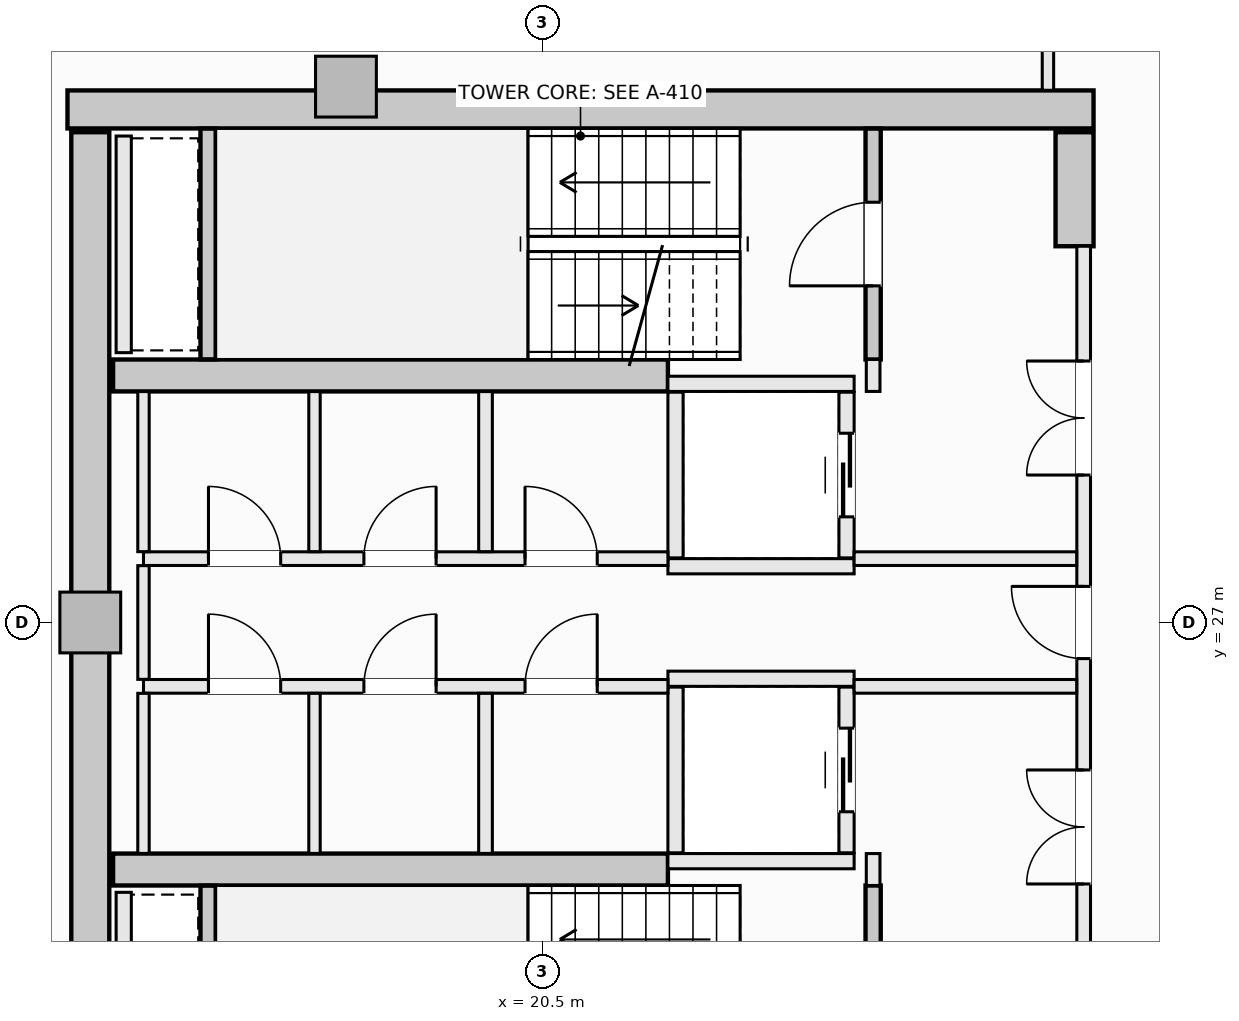
"""IFC4 building model, lengths in metres.
Left out: names, types, materials, properties, quantities, classifications, styles, units other than length and angle.
Written with IfcOpenShell. Run it as: python <this file> out.ifc"""

import sys

from ifc_helpers import new_model, si_unit, direction, frame, frame_2d, origin, origin_2d, place, context, subcontext, project, spatial, rectangle, extrude, element, fill, save


model = new_model("IFC4")
c1 = context("Model", 3, precision=1e-05, world=origin(), true_north=direction((0.0, 1.0)))
c2 = subcontext(c1, "Body", "Model", "MODEL_VIEW")
j1 = project(units=[si_unit("LENGTHUNIT", "METRE"), si_unit("PLANEANGLEUNIT", "RADIAN")], contexts=[c1])
p1 = place(None, origin())
s1 = spatial("IfcSite", under=j1, at=p1, CompositionType="ELEMENT")
p2 = place(p1, origin())
s2 = spatial("IfcBuilding", under=s1, at=p2, CompositionType="ELEMENT")
p3 = place(p2, frame((0.0, 0.0, 262.4)))
s3 = spatial("IfcBuildingStorey", under=s2, at=p3, CompositionType="ELEMENT", Elevation=262.4)
p4 = place(p3, frame((14.25, 33.75, -0.27), z_axis=(0.0, 0.0, 1.0), x_axis=(1.0, 0.0, 0.0)))
e1 = element("IfcWall", 1, at=p4, inside=s3, PredefinedType="SHEAR", context=c2, shape_type="SweptSolid", body=[
    extrude(rectangle(XDim=13.5, YDim=0.5, at=frame_2d((6.75, 0.0))), origin(), (0.0, 0.0, 1.0), 3.3),
])
p5 = place(p3, frame((14.55, 20.55, -0.27), z_axis=(0.0, 0.0, 1.0), x_axis=(0.0, 1.0, 0.0)))
e2 = element("IfcWall", 2, at=p5, inside=s3, PredefinedType="SHEAR", context=c2, shape_type="SweptSolid", body=[
    extrude(rectangle(XDim=12.9, YDim=0.5, at=frame_2d((6.45, 0.0))), origin(), (0.0, 0.0, 1.0), 3.3),
])
p6 = place(p3, frame((27.5, 31.95, -0.27), z_axis=(0.0, 0.0, 1.0), x_axis=(0.0, 1.0, 0.0)))
e3 = element("IfcWall", 3, at=p6, inside=s3, PredefinedType="SHEAR", context=c2, shape_type="SweptSolid", body=[
    extrude(rectangle(XDim=1.5, YDim=0.5, at=frame_2d((0.75, 0.0))), origin(), (0.0, 0.0, 1.0), 3.3),
])
for number, where, z_axis, x_axis in (
    (4, (14.85, 30.25, -0.27), (0.0, 0.0, 1.0), (1.0, 0.0, 0.0)),
    (5, (14.85, 23.75, -0.27), (0.0, 0.0, 1.0), (1.0, 0.0, 0.0)),
):
    element("IfcWall", number, at=place(p3, frame(where, z_axis=z_axis, x_axis=x_axis)), inside=s3, PredefinedType="SHEAR", context=c2, shape_type="SweptSolid", body=[
        extrude(rectangle(XDim=7.3, YDim=0.42, at=frame_2d((3.65, 0.0))), origin(), (0.0, 0.0, 1.0), 3.3),
    ])
for number, where, z_axis, x_axis in (
    (6, (17.914, 34.05, -0.27), (0.0, 0.0, 1.0), (1.0, 0.0, 0.0)),
    (7, (14.55, 27.0, -0.27), (0.0, 0.0, 1.0), (1.0, 0.0, 0.0)),
):
    element("IfcColumn", number, at=place(p3, frame(where, z_axis=z_axis, x_axis=x_axis)), inside=s3, PredefinedType="PILASTER", context=c2, shape_type="SweptSolid", body=[
        extrude(rectangle(XDim=0.8, YDim=0.8, at=origin_2d()), origin(), (0.0, 0.0, 1.0), 3.3),
    ])
p7 = place(p3, frame((24.85, 30.46, -0.27), z_axis=(0.0, 0.0, 1.0), x_axis=(0.0, 1.0, 0.0)))
e8 = element("IfcWall", 8, at=p7, inside=s3, PredefinedType="SHEAR", context=c2, shape_type="SweptSolid", body=[
    extrude(rectangle(XDim=3.038, YDim=0.2, at=frame_2d((1.519, 0.0))), origin(), (0.0, 0.0, 1.0), 3.3),
])
p8 = place(p7, frame((0.969, 0.0, 0.27)))
e9 = element("IfcOpeningElement", 9, at=p8, cuts=e8, PredefinedType="OPENING", context=c2, shape_type="SweptSolid", body=[
    extrude(rectangle(XDim=1.1, YDim=2.15, at=frame_2d((0.55, 1.075))), frame((0.0, 0.11, 0.0), z_axis=(0.0, -1.0, 0.0), x_axis=(1.0, 0.0, 0.0)), (0.0, 0.0, 1.0), 0.22),
])
p9 = place(p3, frame((16.1, 30.462, -0.27), z_axis=(0.0, 0.0, 1.0), x_axis=(0.0, 1.0, 0.0)))
e10 = element("IfcWall", 10, at=p9, inside=s3, PredefinedType="SHEAR", context=c2, shape_type="SweptSolid", body=[
    extrude(rectangle(XDim=3.036, YDim=0.2, at=frame_2d((1.518, 0.0))), origin(), (0.0, 0.0, 1.0), 3.3),
])
p10 = place(p3, frame((24.85, 20.502, -0.27), z_axis=(0.0, 0.0, 1.0), x_axis=(0.0, 1.0, 0.0)))
e11 = element("IfcWall", 11, at=p10, inside=s3, PredefinedType="SHEAR", context=c2, shape_type="SweptSolid", body=[
    extrude(rectangle(XDim=3.038, YDim=0.2, at=frame_2d((1.519, 0.0))), origin(), (0.0, 0.0, 1.0), 3.3),
])
p11 = place(p10, frame((0.969, 0.0, 0.27)))
e12 = element("IfcOpeningElement", 12, at=p11, cuts=e11, PredefinedType="OPENING", context=c2, shape_type="SweptSolid", body=[
    extrude(rectangle(XDim=1.1, YDim=2.15, at=frame_2d((0.55, 1.075))), frame((0.0, 0.11, 0.0), z_axis=(0.0, -1.0, 0.0), x_axis=(1.0, 0.0, 0.0)), (0.0, 0.0, 1.0), 0.22),
])
p12 = place(p3, frame((16.1, 20.502, -0.27), z_axis=(0.0, 0.0, 1.0), x_axis=(0.0, 1.0, 0.0)))
e13 = element("IfcWall", 13, at=p12, inside=s3, PredefinedType="SHEAR", context=c2, shape_type="SweptSolid", body=[
    extrude(rectangle(XDim=3.036, YDim=0.2, at=frame_2d((1.518, 0.0))), origin(), (0.0, 0.0, 1.0), 3.3),
])
for number, where, z_axis, x_axis in (
    (14, (22.15, 30.14, 0.0), (0.0, 0.0, 1.0), (1.0, 0.0, 0.0)),
    (15, (22.15, 27.74, 0.0), (0.0, 0.0, 1.0), (1.0, 0.0, 0.0)),
):
    element("IfcWall", number, at=place(p3, frame(where, z_axis=z_axis, x_axis=x_axis)), inside=s3, PredefinedType="SOLIDWALL", context=c2, shape_type="SweptSolid", body=[
        extrude(rectangle(XDim=2.45, YDim=0.2, at=frame_2d((1.225, 0.0))), origin(), (0.0, 0.0, 1.0), 3.03),
    ])
p13 = place(p3, frame((22.25, 27.85, 0.0), z_axis=(0.0, 0.0, 1.0), x_axis=(0.0, 1.0, 0.0)))
e16 = element("IfcWall", 16, at=p13, inside=s3, PredefinedType="SOLIDWALL", context=c2, shape_type="SweptSolid", body=[
    extrude(rectangle(XDim=2.18, YDim=0.2, at=frame_2d((1.09, 0.0))), origin(), (0.0, 0.0, 1.0), 3.03),
])
p14 = place(p3, frame((24.5, 27.85, 0.0), z_axis=(0.0, 0.0, 1.0), x_axis=(0.0, 1.0, 0.0)))
e17 = element("IfcWall", 17, at=p14, inside=s3, PredefinedType="SOLIDWALL", context=c2, shape_type="SweptSolid", body=[
    extrude(rectangle(XDim=2.18, YDim=0.2, at=frame_2d((1.09, 0.0))), origin(), (0.0, 0.0, 1.0), 3.03),
])
p15 = place(p14, frame((0.54, 0.0, 0.0)))
e18 = element("IfcOpeningElement", 18, at=p15, cuts=e17, PredefinedType="OPENING", context=c2, shape_type="SweptSolid", body=[
    extrude(rectangle(XDim=1.1, YDim=2.2, at=frame_2d((0.55, 1.1))), frame((0.0, 0.11, 0.0), z_axis=(0.0, -1.0, 0.0), x_axis=(1.0, 0.0, 0.0)), (0.0, 0.0, 1.0), 0.22),
])
for number, where, z_axis, x_axis in (
    (19, (22.15, 26.26, 0.0), (0.0, 0.0, 1.0), (1.0, 0.0, 0.0)),
    (20, (22.15, 23.86, 0.0), (0.0, 0.0, 1.0), (1.0, 0.0, 0.0)),
):
    element("IfcWall", number, at=place(p3, frame(where, z_axis=z_axis, x_axis=x_axis)), inside=s3, PredefinedType="SOLIDWALL", context=c2, shape_type="SweptSolid", body=[
        extrude(rectangle(XDim=2.45, YDim=0.2, at=frame_2d((1.225, 0.0))), origin(), (0.0, 0.0, 1.0), 3.03),
    ])
p16 = place(p3, frame((22.25, 23.97, 0.0), z_axis=(0.0, 0.0, 1.0), x_axis=(0.0, 1.0, 0.0)))
e21 = element("IfcWall", 21, at=p16, inside=s3, PredefinedType="SOLIDWALL", context=c2, shape_type="SweptSolid", body=[
    extrude(rectangle(XDim=2.18, YDim=0.2, at=frame_2d((1.09, 0.0))), origin(), (0.0, 0.0, 1.0), 3.03),
])
p17 = place(p3, frame((24.5, 23.97, 0.0), z_axis=(0.0, 0.0, 1.0), x_axis=(0.0, 1.0, 0.0)))
e22 = element("IfcWall", 22, at=p17, inside=s3, PredefinedType="SOLIDWALL", context=c2, shape_type="SweptSolid", body=[
    extrude(rectangle(XDim=2.18, YDim=0.2, at=frame_2d((1.09, 0.0))), origin(), (0.0, 0.0, 1.0), 3.03),
])
p18 = place(p17, frame((0.54, 0.0, 0.0)))
e23 = element("IfcOpeningElement", 23, at=p18, cuts=e22, PredefinedType="OPENING", context=c2, shape_type="SweptSolid", body=[
    extrude(rectangle(XDim=1.1, YDim=2.2, at=frame_2d((0.55, 1.1))), frame((0.0, 0.11, 0.0), z_axis=(0.0, -1.0, 0.0), x_axis=(1.0, 0.0, 0.0)), (0.0, 0.0, 1.0), 0.22),
])
for number, where, z_axis, x_axis in (
    (24, (14.99, 30.55, 0.0), (0.0, 0.0, 1.0), (0.0, 1.0, 0.0)),
    (25, (14.99, 20.6, 0.0), (0.0, 0.0, 1.0), (0.0, 1.0, 0.0)),
):
    element("IfcWall", number, at=place(p3, frame(where, z_axis=z_axis, x_axis=x_axis)), inside=s3, PredefinedType="SOLIDWALL", context=c2, shape_type="SweptSolid", body=[
        extrude(rectangle(XDim=2.85, YDim=0.2, at=frame_2d((1.425, 0.0))), origin(), (0.0, 0.0, 1.0), 3.03),
    ])
for number, where, z_axis, x_axis in (
    (26, (24.85, 23.54, 0.0), (0.0, 0.0, 1.0), (0.0, 1.0, 0.0)),
    (27, (24.85, 30.04, 0.0), (0.0, 0.0, 1.0), (0.0, 1.0, 0.0)),
):
    element("IfcWall", number, at=place(p3, frame(where, z_axis=z_axis, x_axis=x_axis)), inside=s3, PredefinedType="SOLIDWALL", context=c2, shape_type="SweptSolid", body=[
        extrude(rectangle(XDim=0.42, YDim=0.18, at=frame_2d((0.21, 0.0))), origin(), (0.0, 0.0, 1.0), 3.03),
    ])
p19 = place(p3, frame((27.62, 22.05, 0.0), z_axis=(0.0, 0.0, 1.0), x_axis=(0.0, 1.0, 0.0)))
e28 = element("IfcWall", 28, at=p19, inside=s3, PredefinedType="SOLIDWALL", context=c2, shape_type="SweptSolid", body=[
    extrude(rectangle(XDim=9.9, YDim=0.18, at=frame_2d((4.95, 0.0))), origin(), (0.0, 0.0, 1.0), 3.03),
])
p20 = place(p19, frame((4.475, 0.0, 0.0)))
e29 = element("IfcOpeningElement", 29, at=p20, cuts=e28, PredefinedType="OPENING", context=c2, shape_type="SweptSolid", body=[
    extrude(rectangle(XDim=0.95, YDim=2.1, at=frame_2d((0.475, 1.05))), frame((0.0, 0.1, 0.0), z_axis=(0.0, -1.0, 0.0), x_axis=(1.0, 0.0, 0.0)), (0.0, 0.0, 1.0), 0.2),
])
p21 = place(p19, frame((6.89, 0.0, 0.0)))
e30 = element("IfcOpeningElement", 30, at=p21, cuts=e28, PredefinedType="OPENING", context=c2, shape_type="SweptSolid", body=[
    extrude(rectangle(XDim=1.5, YDim=2.2, at=frame_2d((0.75, 1.1))), frame((0.0, 0.1, 0.0), z_axis=(0.0, -1.0, 0.0), x_axis=(1.0, 0.0, 0.0)), (0.0, 0.0, 1.0), 0.2),
])
p22 = place(p19, frame((1.51, 0.0, 0.0)))
e31 = element("IfcOpeningElement", 31, at=p22, cuts=e28, PredefinedType="OPENING", context=c2, shape_type="SweptSolid", body=[
    extrude(rectangle(XDim=1.5, YDim=2.2, at=frame_2d((0.75, 1.1))), frame((0.0, 0.1, 0.0), z_axis=(0.0, -1.0, 0.0), x_axis=(1.0, 0.0, 0.0)), (0.0, 0.0, 1.0), 0.2),
])
p23 = place(p3, frame((15.25, 27.84, 0.0), z_axis=(0.0, 0.0, 1.0), x_axis=(1.0, 0.0, 0.0)))
e32 = element("IfcWall", 32, at=p23, inside=s3, PredefinedType="SOLIDWALL", context=c2, shape_type="SweptSolid", body=[
    extrude(rectangle(XDim=6.9, YDim=0.18, at=frame_2d((3.45, 0.0))), origin(), (0.0, 0.0, 1.0), 3.03),
])
p24 = place(p23, frame((5.02, 0.0, 0.0)))
e33 = element("IfcOpeningElement", 33, at=p24, cuts=e32, PredefinedType="OPENING", context=c2, shape_type="SweptSolid", body=[
    extrude(rectangle(XDim=0.95, YDim=2.1, at=frame_2d((0.475, 1.05))), frame((0.0, 0.1, 0.0), z_axis=(0.0, -1.0, 0.0), x_axis=(1.0, 0.0, 0.0)), (0.0, 0.0, 1.0), 0.2),
])
p25 = place(p23, frame((0.855, 0.0, 0.0)))
e34 = element("IfcOpeningElement", 34, at=p25, cuts=e32, PredefinedType="OPENING", context=c2, shape_type="SweptSolid", body=[
    extrude(rectangle(XDim=0.95, YDim=2.1, at=frame_2d((0.475, 1.05))), frame((0.0, 0.1, 0.0), z_axis=(0.0, -1.0, 0.0), x_axis=(1.0, 0.0, 0.0)), (0.0, 0.0, 1.0), 0.2),
])
p26 = place(p23, frame((2.9, 0.0, 0.0)))
e35 = element("IfcOpeningElement", 35, at=p26, cuts=e32, PredefinedType="OPENING", context=c2, shape_type="SweptSolid", body=[
    extrude(rectangle(XDim=0.95, YDim=2.1, at=frame_2d((0.475, 1.05))), frame((0.0, 0.1, 0.0), z_axis=(0.0, -1.0, 0.0), x_axis=(1.0, 0.0, 0.0)), (0.0, 0.0, 1.0), 0.2),
])
p27 = place(p3, frame((24.6, 27.84, 0.0), z_axis=(0.0, 0.0, 1.0), x_axis=(1.0, 0.0, 0.0)))
e36 = element("IfcWall", 36, at=p27, inside=s3, PredefinedType="SOLIDWALL", context=c2, shape_type="SweptSolid", body=[
    extrude(rectangle(XDim=2.928, YDim=0.18, at=frame_2d((1.464, 0.0))), origin(), (0.0, 0.0, 1.0), 3.03),
])
p28 = place(p3, frame((15.25, 26.16, 0.0), z_axis=(0.0, 0.0, 1.0), x_axis=(1.0, 0.0, 0.0)))
e37 = element("IfcWall", 37, at=p28, inside=s3, PredefinedType="SOLIDWALL", context=c2, shape_type="SweptSolid", body=[
    extrude(rectangle(XDim=6.9, YDim=0.18, at=frame_2d((3.45, 0.0))), origin(), (0.0, 0.0, 1.0), 3.03),
])
p29 = place(p28, frame((5.02, 0.0, 0.0)))
e38 = element("IfcOpeningElement", 38, at=p29, cuts=e37, PredefinedType="OPENING", context=c2, shape_type="SweptSolid", body=[
    extrude(rectangle(XDim=0.95, YDim=2.1, at=frame_2d((0.475, 1.05))), frame((0.0, 0.1, 0.0), z_axis=(0.0, -1.0, 0.0), x_axis=(1.0, 0.0, 0.0)), (0.0, 0.0, 1.0), 0.2),
])
p30 = place(p28, frame((0.855, 0.0, 0.0)))
e39 = element("IfcOpeningElement", 39, at=p30, cuts=e37, PredefinedType="OPENING", context=c2, shape_type="SweptSolid", body=[
    extrude(rectangle(XDim=0.95, YDim=2.1, at=frame_2d((0.475, 1.05))), frame((0.0, 0.1, 0.0), z_axis=(0.0, -1.0, 0.0), x_axis=(1.0, 0.0, 0.0)), (0.0, 0.0, 1.0), 0.2),
])
p31 = place(p28, frame((2.9, 0.0, 0.0)))
e40 = element("IfcOpeningElement", 40, at=p31, cuts=e37, PredefinedType="OPENING", context=c2, shape_type="SweptSolid", body=[
    extrude(rectangle(XDim=0.95, YDim=2.1, at=frame_2d((0.475, 1.05))), frame((0.0, 0.1, 0.0), z_axis=(0.0, -1.0, 0.0), x_axis=(1.0, 0.0, 0.0)), (0.0, 0.0, 1.0), 0.2),
])
p32 = place(p3, frame((24.6, 26.16, 0.0), z_axis=(0.0, 0.0, 1.0), x_axis=(1.0, 0.0, 0.0)))
e41 = element("IfcWall", 41, at=p32, inside=s3, PredefinedType="SOLIDWALL", context=c2, shape_type="SweptSolid", body=[
    extrude(rectangle(XDim=2.928, YDim=0.18, at=frame_2d((1.464, 0.0))), origin(), (0.0, 0.0, 1.0), 3.03),
])
p33 = place(p3, frame((15.25, 23.962, 0.0), z_axis=(0.0, 0.0, 1.0), x_axis=(0.0, 1.0, 0.0)))
e42 = element("IfcWall", 42, at=p33, inside=s3, PredefinedType="PARTITIONING", context=c2, shape_type="SweptSolid", body=[
    extrude(rectangle(XDim=2.106, YDim=0.15, at=frame_2d((1.053, 0.0))), origin(), (0.0, 0.0, 1.0), 3.03),
])
p34 = place(p3, frame((15.25, 26.252, 0.0), z_axis=(0.0, 0.0, 1.0), x_axis=(0.0, 1.0, 0.0)))
e43 = element("IfcWall", 43, at=p34, inside=s3, PredefinedType="PARTITIONING", context=c2, shape_type="SweptSolid", body=[
    extrude(rectangle(XDim=1.496, YDim=0.15, at=frame_2d((0.748, 0.0))), origin(), (0.0, 0.0, 1.0), 3.03),
])
p35 = place(p3, frame((15.25, 27.932, 0.0), z_axis=(0.0, 0.0, 1.0), x_axis=(0.0, 1.0, 0.0)))
e44 = element("IfcWall", 44, at=p35, inside=s3, PredefinedType="PARTITIONING", context=c2, shape_type="SweptSolid", body=[
    extrude(rectangle(XDim=2.106, YDim=0.15, at=frame_2d((1.053, 0.0))), origin(), (0.0, 0.0, 1.0), 3.03),
])
for number, where, z_axis, x_axis in (
    (45, (19.75, 23.962, 0.0), (0.0, 0.0, 1.0), (0.0, 1.0, 0.0)),
    (46, (19.75, 27.932, 0.0), (0.0, 0.0, 1.0), (0.0, 1.0, 0.0)),
):
    element("IfcWall", number, at=place(p3, frame(where, z_axis=z_axis, x_axis=x_axis)), inside=s3, PredefinedType="SOLIDWALL", context=c2, shape_type="SweptSolid", body=[
        extrude(rectangle(XDim=2.106, YDim=0.18, at=frame_2d((1.053, 0.0))), origin(), (0.0, 0.0, 1.0), 3.03),
    ])
for number, where, z_axis, x_axis in (
    (47, (17.5, 23.962, 0.0), (0.0, 0.0, 1.0), (0.0, 1.0, 0.0)),
    (48, (17.5, 27.932, 0.0), (0.0, 0.0, 1.0), (0.0, 1.0, 0.0)),
):
    element("IfcWall", number, at=place(p3, frame(where, z_axis=z_axis, x_axis=x_axis)), inside=s3, PredefinedType="PARTITIONING", context=c2, shape_type="SweptSolid", body=[
        extrude(rectangle(XDim=2.106, YDim=0.15, at=frame_2d((1.053, 0.0))), origin(), (0.0, 0.0, 1.0), 3.03),
    ])
p36 = place(p3, frame((27.15, 34.002, 0.0), z_axis=(0.0, 0.0, 1.0), x_axis=(0.0, 1.0, 0.0)))
e49 = element("IfcWall", 49, at=p36, inside=s3, PredefinedType="PARTITIONING", context=c2, shape_type="SweptSolid", body=[
    extrude(rectangle(XDim=4.198, YDim=0.15, at=frame_2d((2.099, 0.0))), origin(), (0.0, 0.0, 1.0), 3.03),
])
p37 = place(p36, frame((1.998, 0.0, 0.0)))
e50 = element("IfcOpeningElement", 50, at=p37, cuts=e49, PredefinedType="OPENING", context=c2, shape_type="SweptSolid", body=[
    extrude(rectangle(XDim=0.95, YDim=2.1, at=frame_2d((0.475, 1.05))), frame((0.0, 0.085, 0.0), z_axis=(0.0, -1.0, 0.0), x_axis=(1.0, 0.0, 0.0)), (0.0, 0.0, 1.0), 0.17),
])
p38 = place(p8, origin())
e51 = element("IfcDoor", 51, at=p38, inside=s3, OperationType="SINGLE_SWING_LEFT", PredefinedType="DOOR", context=c2, shape_type="SweptSolid", body=[
    extrude(rectangle(XDim=1.1, YDim=2.15, at=frame_2d((0.55, 1.075))), frame((0.0, 0.025, 0.0), z_axis=(0.0, -1.0, 0.0), x_axis=(1.0, 0.0, 0.0)), (0.0, 0.0, 1.0), 0.05),
])
fill(e9, e51)
p39 = place(p15, origin())
e52 = element("IfcDoor", 52, at=p39, inside=s3, OperationType="SLIDING_TO_LEFT", PredefinedType="DOOR", context=c2, shape_type="SweptSolid", body=[
    extrude(rectangle(XDim=1.1, YDim=2.2, at=frame_2d((0.55, 1.1))), frame((0.0, 0.025, 0.0), z_axis=(0.0, -1.0, 0.0), x_axis=(1.0, 0.0, 0.0)), (0.0, 0.0, 1.0), 0.05),
])
fill(e18, e52)
p40 = place(p18, origin())
e53 = element("IfcDoor", 53, at=p40, inside=s3, OperationType="SLIDING_TO_LEFT", PredefinedType="DOOR", context=c2, shape_type="SweptSolid", body=[
    extrude(rectangle(XDim=1.1, YDim=2.2, at=frame_2d((0.55, 1.1))), frame((0.0, 0.025, 0.0), z_axis=(0.0, -1.0, 0.0), x_axis=(1.0, 0.0, 0.0)), (0.0, 0.0, 1.0), 0.05),
])
fill(e23, e53)
p41 = place(p20, origin())
e54 = element("IfcDoor", 54, at=p41, inside=s3, OperationType="SINGLE_SWING_RIGHT", PredefinedType="DOOR", context=c2, shape_type="SweptSolid", body=[
    extrude(rectangle(XDim=0.95, YDim=2.1, at=frame_2d((0.475, 1.05))), frame((0.0, 0.025, 0.0), z_axis=(0.0, -1.0, 0.0), x_axis=(1.0, 0.0, 0.0)), (0.0, 0.0, 1.0), 0.05),
])
fill(e29, e54)
p42 = place(p21, origin())
e55 = element("IfcDoor", 55, at=p42, inside=s3, OperationType="DOUBLE_DOOR_SINGLE_SWING", PredefinedType="DOOR", context=c2, shape_type="SweptSolid", body=[
    extrude(rectangle(XDim=1.5, YDim=2.2, at=frame_2d((0.75, 1.1))), frame((0.0, 0.025, 0.0), z_axis=(0.0, -1.0, 0.0), x_axis=(1.0, 0.0, 0.0)), (0.0, 0.0, 1.0), 0.05),
])
fill(e30, e55)
p43 = place(p22, origin())
e56 = element("IfcDoor", 56, at=p43, inside=s3, OperationType="DOUBLE_DOOR_SINGLE_SWING", PredefinedType="DOOR", context=c2, shape_type="SweptSolid", body=[
    extrude(rectangle(XDim=1.5, YDim=2.2, at=frame_2d((0.75, 1.1))), frame((0.0, 0.025, 0.0), z_axis=(0.0, -1.0, 0.0), x_axis=(1.0, 0.0, 0.0)), (0.0, 0.0, 1.0), 0.05),
])
fill(e31, e56)
p44 = place(p24, origin())
e57 = element("IfcDoor", 57, at=p44, inside=s3, OperationType="SINGLE_SWING_LEFT", PredefinedType="DOOR", context=c2, shape_type="SweptSolid", body=[
    extrude(rectangle(XDim=0.95, YDim=2.1, at=frame_2d((0.475, 1.05))), frame((0.0, 0.025, 0.0), z_axis=(0.0, -1.0, 0.0), x_axis=(1.0, 0.0, 0.0)), (0.0, 0.0, 1.0), 0.05),
])
fill(e33, e57)
p45 = place(p29, origin())
e58 = element("IfcDoor", 58, at=p45, inside=s3, OperationType="SINGLE_SWING_RIGHT", PredefinedType="DOOR", context=c2, shape_type="SweptSolid", body=[
    extrude(rectangle(XDim=0.95, YDim=2.1, at=frame_2d((0.475, 1.05))), frame((0.0, 0.025, 0.0), z_axis=(0.0, -1.0, 0.0), x_axis=(1.0, 0.0, 0.0)), (0.0, 0.0, 1.0), 0.05),
])
fill(e38, e58)
p46 = place(p25, origin())
e59 = element("IfcDoor", 59, at=p46, inside=s3, OperationType="SINGLE_SWING_LEFT", PredefinedType="DOOR", context=c2, shape_type="SweptSolid", body=[
    extrude(rectangle(XDim=0.95, YDim=2.1, at=frame_2d((0.475, 1.05))), frame((0.0, 0.025, 0.0), z_axis=(0.0, -1.0, 0.0), x_axis=(1.0, 0.0, 0.0)), (0.0, 0.0, 1.0), 0.05),
])
fill(e34, e59)
p47 = place(p26, origin())
e60 = element("IfcDoor", 60, at=p47, inside=s3, OperationType="SINGLE_SWING_RIGHT", PredefinedType="DOOR", context=c2, shape_type="SweptSolid", body=[
    extrude(rectangle(XDim=0.95, YDim=2.1, at=frame_2d((0.475, 1.05))), frame((0.0, 0.025, 0.0), z_axis=(0.0, -1.0, 0.0), x_axis=(1.0, 0.0, 0.0)), (0.0, 0.0, 1.0), 0.05),
])
fill(e35, e60)
p48 = place(p30, origin())
e61 = element("IfcDoor", 61, at=p48, inside=s3, OperationType="SINGLE_SWING_LEFT", PredefinedType="DOOR", context=c2, shape_type="SweptSolid", body=[
    extrude(rectangle(XDim=0.95, YDim=2.1, at=frame_2d((0.475, 1.05))), frame((0.0, 0.025, 0.0), z_axis=(0.0, -1.0, 0.0), x_axis=(1.0, 0.0, 0.0)), (0.0, 0.0, 1.0), 0.05),
])
fill(e39, e61)
p49 = place(p31, origin())
e62 = element("IfcDoor", 62, at=p49, inside=s3, OperationType="SINGLE_SWING_RIGHT", PredefinedType="DOOR", context=c2, shape_type="SweptSolid", body=[
    extrude(rectangle(XDim=0.95, YDim=2.1, at=frame_2d((0.475, 1.05))), frame((0.0, 0.025, 0.0), z_axis=(0.0, -1.0, 0.0), x_axis=(1.0, 0.0, 0.0)), (0.0, 0.0, 1.0), 0.05),
])
fill(e40, e62)
save(model, sys.argv[1])
